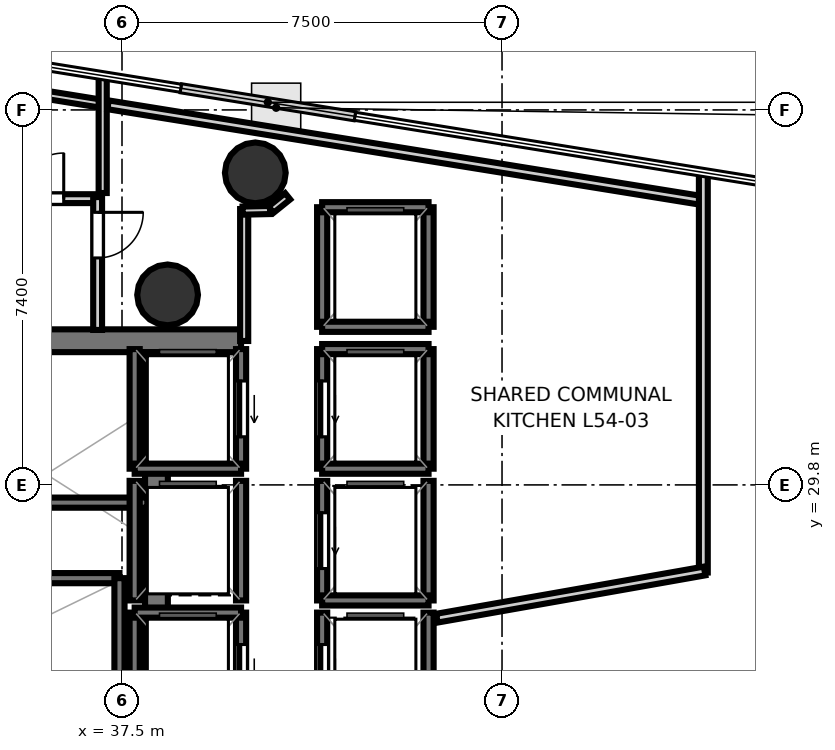
"""IFC4 building model, lengths in metres.
Left out: names, types, materials, properties, quantities, classifications, styles, units other than length and angle.
Written with IfcOpenShell. Run it as: python <this file> out.ifc"""

import sys

from ifc_helpers import new_model, si_unit, direction, frame, frame_2d, origin, origin_2d, place, context, subcontext, project, spatial, rectangle, hollow_circle, extrude, element, fill, save


model = new_model("IFC4")
c1 = context("Model", 3, precision=1e-05, world=origin(), true_north=direction((0.0, 1.0)))
c2 = subcontext(c1, "Body", "Model", "MODEL_VIEW")
j1 = project(units=[si_unit("LENGTHUNIT", "METRE"), si_unit("PLANEANGLEUNIT", "RADIAN")], contexts=[c1])
p1 = place(None, origin())
s1 = spatial("IfcSite", under=j1, at=p1, CompositionType="ELEMENT")
p2 = place(p1, origin())
s2 = spatial("IfcBuilding", under=s1, at=p2, CompositionType="ELEMENT")
p3 = place(p2, frame((0.0, 0.0, 211.4)))
s3 = spatial("IfcBuildingStorey", under=s2, at=p3, CompositionType="ELEMENT", Elevation=211.4)
p4 = place(p3, frame((29.33, 32.645, 0.0), z_axis=(0.0, 0.0, 1.0), x_axis=(1.0, 0.0, 0.0)))
e1 = element("IfcWall", 1, at=p4, inside=s3, PredefinedType="SHEAR", context=c2, shape_type="SweptSolid", body=[
    extrude(rectangle(XDim=10.52, YDim=0.45, at=frame_2d((5.26, 0.0))), origin(), (0.0, 0.0, 1.0), 3.52),
])
p5 = place(p4, frame((0.895, 0.0, 0.0)))
e2 = element("IfcOpeningElement", 2, at=p5, cuts=e1, PredefinedType="OPENING", context=c2, shape_type="SweptSolid", body=[
    extrude(rectangle(XDim=1.25, YDim=2.15, at=frame_2d((0.625, 1.075))), frame((0.0, 0.235, 0.0), z_axis=(0.0, -1.0, 0.0), x_axis=(1.0, 0.0, 0.0)), (0.0, 0.0, 1.0), 0.47),
])
p6 = place(p3, frame((38.18, 24.98, 0.0), z_axis=(0.0, 0.0, 1.0), x_axis=(0.0, 1.0, 0.0)))
e3 = element("IfcWall", 3, at=p6, inside=s3, PredefinedType="SHEAR", context=c2, shape_type="SweptSolid", body=[
    extrude(rectangle(XDim=7.44, YDim=0.45, at=frame_2d((3.72, 0.0))), origin(), (0.0, 0.0, 1.0), 3.52),
])
for number, where, z_axis, x_axis in (
    (4, (38.4, 33.55, 0.0), (0.0, 0.0, 1.0), (1.0, 0.0, 0.0)),
    (5, (40.131, 35.958, 0.0), (0.0, 0.0, 1.0), (1.0, 0.0, 0.0)),
):
    element("IfcColumn", number, at=place(p3, frame(where, z_axis=z_axis, x_axis=x_axis)), inside=s3, PredefinedType="COLUMN", context=c2, shape_type="SweptSolid", body=[
        extrude(hollow_circle(Radius=0.6, WallThickness=0.03, at=origin_2d()), origin(), (0.0, 0.0, 1.0), 3.7),
    ])
p7 = place(p3, frame((29.7, 29.45, 0.0), z_axis=(0.0, 0.0, 1.0), x_axis=(1.0, 0.0, 0.0)))
e6 = element("IfcWall", 6, at=p7, inside=s3, PredefinedType="SOLIDWALL", context=c2, shape_type="SweptSolid", body=[
    extrude(rectangle(XDim=8.3, YDim=0.2, at=frame_2d((4.15, 0.0))), origin(), (0.0, 0.0, 1.0), 3.52),
])
p8 = place(p3, frame((29.7, 27.96, 0.0), z_axis=(0.0, 0.0, 1.0), x_axis=(1.0, 0.0, 0.0)))
e7 = element("IfcWall", 7, at=p8, inside=s3, PredefinedType="SOLIDWALL", context=c2, shape_type="SweptSolid", body=[
    extrude(rectangle(XDim=7.75, YDim=0.2, at=frame_2d((3.875, 0.0))), origin(), (0.0, 0.0, 1.0), 3.52),
])
p9 = place(p3, frame((37.45, 24.9, 0.0), z_axis=(0.0, 0.0, 1.0), x_axis=(0.0, 1.0, 0.0)))
e8 = element("IfcWall", 8, at=p9, inside=s3, PredefinedType="SOLIDWALL", context=c2, shape_type="SweptSolid", body=[
    extrude(rectangle(XDim=3.06, YDim=0.2, at=frame_2d((1.53, 0.0))), origin(), (0.0, 0.0, 1.0), 3.52),
])
p10 = place(p3, frame((39.85, 30.12, 0.0), z_axis=(0.0, 0.0, 1.0), x_axis=(0.0, 1.0, 0.0)))
e9 = element("IfcWall", 9, at=p10, inside=s3, PredefinedType="SOLIDWALL", context=c2, shape_type="SweptSolid", body=[
    extrude(rectangle(XDim=2.36, YDim=0.2, at=frame_2d((1.18, 0.0))), origin(), (0.0, 0.0, 1.0), 3.52),
])
p11 = place(p10, frame((0.63, 0.0, 0.0)))
e10 = element("IfcOpeningElement", 10, at=p11, cuts=e9, PredefinedType="OPENING", context=c2, shape_type="SweptSolid", body=[
    extrude(rectangle(XDim=1.1, YDim=2.15, at=frame_2d((0.55, 1.075))), frame((0.0, 0.11, 0.0), z_axis=(0.0, -1.0, 0.0), x_axis=(1.0, 0.0, 0.0)), (0.0, 0.0, 1.0), 0.22),
])
p12 = place(p3, frame((37.75, 30.12, 0.0), z_axis=(0.0, 0.0, 1.0), x_axis=(0.0, 1.0, 0.0)))
e11 = element("IfcWall", 11, at=p12, inside=s3, PredefinedType="SOLIDWALL", context=c2, shape_type="SweptSolid", body=[
    extrude(rectangle(XDim=2.36, YDim=0.2, at=frame_2d((1.18, 0.0))), origin(), (0.0, 0.0, 1.0), 3.52),
])
p13 = place(p3, frame((37.75, 30.12, 0.0), z_axis=(0.0, 0.0, 1.0), x_axis=(1.0, 0.0, 0.0)))
e12 = element("IfcWall", 12, at=p13, inside=s3, PredefinedType="SOLIDWALL", context=c2, shape_type="SweptSolid", body=[
    extrude(rectangle(XDim=2.1, YDim=0.2, at=frame_2d((1.05, 0.0))), origin(), (0.0, 0.0, 1.0), 3.52),
])
p14 = place(p3, frame((39.85, 24.92, 0.0), z_axis=(0.0, 0.0, 1.0), x_axis=(0.0, 1.0, 0.0)))
e13 = element("IfcWall", 13, at=p14, inside=s3, PredefinedType="SOLIDWALL", context=c2, shape_type="SweptSolid", body=[
    extrude(rectangle(XDim=2.36, YDim=0.2, at=frame_2d((1.18, 0.0))), origin(), (0.0, 0.0, 1.0), 3.52),
])
p15 = place(p14, frame((0.63, 0.0, 0.0)))
e14 = element("IfcOpeningElement", 14, at=p15, cuts=e13, PredefinedType="OPENING", context=c2, shape_type="SweptSolid", body=[
    extrude(rectangle(XDim=1.1, YDim=2.15, at=frame_2d((0.55, 1.075))), frame((0.0, 0.11, 0.0), z_axis=(0.0, -1.0, 0.0), x_axis=(1.0, 0.0, 0.0)), (0.0, 0.0, 1.0), 0.22),
])
p16 = place(p3, frame((37.75, 24.92, 0.0), z_axis=(0.0, 0.0, 1.0), x_axis=(0.0, 1.0, 0.0)))
e15 = element("IfcWall", 15, at=p16, inside=s3, PredefinedType="SOLIDWALL", context=c2, shape_type="SweptSolid", body=[
    extrude(rectangle(XDim=2.36, YDim=0.2, at=frame_2d((1.18, 0.0))), origin(), (0.0, 0.0, 1.0), 3.52),
])
p17 = place(p3, frame((37.75, 27.28, 0.0), z_axis=(0.0, 0.0, 1.0), x_axis=(1.0, 0.0, 0.0)))
e16 = element("IfcWall", 16, at=p17, inside=s3, PredefinedType="SOLIDWALL", context=c2, shape_type="SweptSolid", body=[
    extrude(rectangle(XDim=2.1, YDim=0.2, at=frame_2d((1.05, 0.0))), origin(), (0.0, 0.0, 1.0), 3.52),
])
p18 = place(p3, frame((43.55, 30.12, 0.0), z_axis=(0.0, 0.0, 1.0), x_axis=(0.0, 1.0, 0.0)))
e17 = element("IfcWall", 17, at=p18, inside=s3, PredefinedType="SOLIDWALL", context=c2, shape_type="SweptSolid", body=[
    extrude(rectangle(XDim=2.36, YDim=0.2, at=frame_2d((1.18, 0.0))), origin(), (0.0, 0.0, 1.0), 3.52),
])
p19 = place(p3, frame((41.45, 30.12, 0.0), z_axis=(0.0, 0.0, 1.0), x_axis=(0.0, 1.0, 0.0)))
e18 = element("IfcWall", 18, at=p19, inside=s3, PredefinedType="SOLIDWALL", context=c2, shape_type="SweptSolid", body=[
    extrude(rectangle(XDim=2.36, YDim=0.2, at=frame_2d((1.18, 0.0))), origin(), (0.0, 0.0, 1.0), 3.52),
])
p20 = place(p19, frame((0.63, 0.0, 0.0)))
e19 = element("IfcOpeningElement", 19, at=p20, cuts=e18, PredefinedType="OPENING", context=c2, shape_type="SweptSolid", body=[
    extrude(rectangle(XDim=1.1, YDim=2.15, at=frame_2d((0.55, 1.075))), frame((0.0, 0.11, 0.0), z_axis=(0.0, -1.0, 0.0), x_axis=(1.0, 0.0, 0.0)), (0.0, 0.0, 1.0), 0.22),
])
for number, where, z_axis, x_axis in (
    (20, (41.45, 32.48, 0.0), (0.0, 0.0, 1.0), (1.0, 0.0, 0.0)),
    (21, (41.45, 30.12, 0.0), (0.0, 0.0, 1.0), (1.0, 0.0, 0.0)),
):
    element("IfcWall", number, at=place(p3, frame(where, z_axis=z_axis, x_axis=x_axis)), inside=s3, PredefinedType="SOLIDWALL", context=c2, shape_type="SweptSolid", body=[
        extrude(rectangle(XDim=2.1, YDim=0.2, at=frame_2d((1.05, 0.0))), origin(), (0.0, 0.0, 1.0), 3.52),
    ])
p21 = place(p3, frame((43.55, 27.52, 0.0), z_axis=(0.0, 0.0, 1.0), x_axis=(0.0, 1.0, 0.0)))
e22 = element("IfcWall", 22, at=p21, inside=s3, PredefinedType="SOLIDWALL", context=c2, shape_type="SweptSolid", body=[
    extrude(rectangle(XDim=2.36, YDim=0.2, at=frame_2d((1.18, 0.0))), origin(), (0.0, 0.0, 1.0), 3.52),
])
p22 = place(p3, frame((41.45, 27.52, 0.0), z_axis=(0.0, 0.0, 1.0), x_axis=(0.0, 1.0, 0.0)))
e23 = element("IfcWall", 23, at=p22, inside=s3, PredefinedType="SOLIDWALL", context=c2, shape_type="SweptSolid", body=[
    extrude(rectangle(XDim=2.36, YDim=0.2, at=frame_2d((1.18, 0.0))), origin(), (0.0, 0.0, 1.0), 3.52),
])
p23 = place(p22, frame((0.63, 0.0, 0.0)))
e24 = element("IfcOpeningElement", 24, at=p23, cuts=e23, PredefinedType="OPENING", context=c2, shape_type="SweptSolid", body=[
    extrude(rectangle(XDim=1.1, YDim=2.15, at=frame_2d((0.55, 1.075))), frame((0.0, 0.11, 0.0), z_axis=(0.0, -1.0, 0.0), x_axis=(1.0, 0.0, 0.0)), (0.0, 0.0, 1.0), 0.22),
])
p24 = place(p3, frame((41.45, 27.52, 0.0), z_axis=(0.0, 0.0, 1.0), x_axis=(1.0, 0.0, 0.0)))
e25 = element("IfcWall", 25, at=p24, inside=s3, PredefinedType="SOLIDWALL", context=c2, shape_type="SweptSolid", body=[
    extrude(rectangle(XDim=2.1, YDim=0.2, at=frame_2d((1.05, 0.0))), origin(), (0.0, 0.0, 1.0), 3.52),
])
p25 = place(p3, frame((43.55, 24.92, 0.0), z_axis=(0.0, 0.0, 1.0), x_axis=(0.0, 1.0, 0.0)))
e26 = element("IfcWall", 26, at=p25, inside=s3, PredefinedType="SOLIDWALL", context=c2, shape_type="SweptSolid", body=[
    extrude(rectangle(XDim=2.36, YDim=0.2, at=frame_2d((1.18, 0.0))), origin(), (0.0, 0.0, 1.0), 3.52),
])
p26 = place(p3, frame((41.45, 24.92, 0.0), z_axis=(0.0, 0.0, 1.0), x_axis=(0.0, 1.0, 0.0)))
e27 = element("IfcWall", 27, at=p26, inside=s3, PredefinedType="SOLIDWALL", context=c2, shape_type="SweptSolid", body=[
    extrude(rectangle(XDim=2.36, YDim=0.2, at=frame_2d((1.18, 0.0))), origin(), (0.0, 0.0, 1.0), 3.52),
])
p27 = place(p26, frame((0.63, 0.0, 0.0)))
e28 = element("IfcOpeningElement", 28, at=p27, cuts=e27, PredefinedType="OPENING", context=c2, shape_type="SweptSolid", body=[
    extrude(rectangle(XDim=1.1, YDim=2.15, at=frame_2d((0.55, 1.075))), frame((0.0, 0.11, 0.0), z_axis=(0.0, -1.0, 0.0), x_axis=(1.0, 0.0, 0.0)), (0.0, 0.0, 1.0), 0.22),
])
for number, where, z_axis, x_axis in (
    (29, (39.85, 27.52, 0.0), (0.0, 0.0, 1.0), (0.0, 1.0, 0.0)),
    (30, (37.75, 27.52, 0.0), (0.0, 0.0, 1.0), (0.0, 1.0, 0.0)),
):
    element("IfcWall", number, at=place(p3, frame(where, z_axis=z_axis, x_axis=x_axis)), inside=s3, PredefinedType="SOLIDWALL", context=c2, shape_type="SweptSolid", body=[
        extrude(rectangle(XDim=2.36, YDim=0.2, at=frame_2d((1.18, 0.0))), origin(), (0.0, 0.0, 1.0), 3.52),
    ])
for number, where, z_axis, x_axis in (
    (31, (43.55, 32.92, 0.0), (0.0, 0.0, 1.0), (0.0, 1.0, 0.0)),
    (32, (41.45, 32.92, 0.0), (0.0, 0.0, 1.0), (0.0, 1.0, 0.0)),
):
    element("IfcWall", number, at=place(p3, frame(where, z_axis=z_axis, x_axis=x_axis)), inside=s3, PredefinedType="SOLIDWALL", context=c2, shape_type="SweptSolid", body=[
        extrude(rectangle(XDim=2.36, YDim=0.2, at=frame_2d((1.18, 0.0))), origin(), (0.0, 0.0, 1.0), 3.52),
    ])
for number, where, z_axis, x_axis in (
    (33, (41.45, 35.28, 0.0), (0.0, 0.0, 1.0), (1.0, 0.0, 0.0)),
    (34, (41.45, 32.92, 0.0), (0.0, 0.0, 1.0), (1.0, 0.0, 0.0)),
):
    element("IfcWall", number, at=place(p3, frame(where, z_axis=z_axis, x_axis=x_axis)), inside=s3, PredefinedType="SOLIDWALL", context=c2, shape_type="SweptSolid", body=[
        extrude(rectangle(XDim=2.1, YDim=0.2, at=frame_2d((1.05, 0.0))), origin(), (0.0, 0.0, 1.0), 3.52),
    ])
p28 = place(p3, frame((39.911, 32.64, 0.0), z_axis=(0.0, 0.0, 1.0), x_axis=(0.0, 1.0, 0.0)))
e35 = element("IfcWall", 35, at=p28, inside=s3, PredefinedType="PARTITIONING", context=c2, shape_type="SweptSolid", body=[
    extrude(rectangle(XDim=2.604, YDim=0.16, at=frame_2d((1.302, 0.0))), origin(), (0.0, 0.0, 1.0), 2.84),
])
p29 = place(p3, frame((39.881, 35.213, 0.0), z_axis=(0.0, 0.0, 1.0), x_axis=(0.999756500784, 0.02206669754, 0.0)))
e36 = element("IfcWall", 36, at=p29, inside=s3, PredefinedType="PARTITIONING", context=c2, shape_type="SweptSolid", body=[
    extrude(rectangle(XDim=0.542, YDim=0.16, at=frame_2d((0.271, 0.0))), origin(), (0.0, 0.0, 1.0), 2.84),
])
p30 = place(p3, frame((40.441, 35.232, 0.0), z_axis=(0.0, 0.0, 1.0), x_axis=(0.778714564707, 0.627378376033, 0.0)))
e37 = element("IfcWall", 37, at=p30, inside=s3, PredefinedType="PARTITIONING", context=c2, shape_type="SweptSolid", body=[
    extrude(rectangle(XDim=0.421, YDim=0.16, at=frame_2d((0.21, 0.0))), origin(), (0.0, 0.0, 1.0), 2.84),
])
p31 = place(p3, frame((34.75, 35.449, 0.0), z_axis=(0.0, 0.0, 1.0), x_axis=(1.0, 0.0, 0.0)))
e38 = element("IfcWall", 38, at=p31, inside=s3, PredefinedType="PLUMBINGWALL", context=c2, shape_type="SweptSolid", body=[
    extrude(rectangle(XDim=2.3, YDim=0.175, at=frame_2d((1.15, 0.0))), origin(), (0.0, 0.0, 1.0), 2.84),
])
p32 = place(p31, frame((0.7, 0.0, 0.0)))
e39 = element("IfcOpeningElement", 39, at=p32, cuts=e38, PredefinedType="OPENING", context=c2, shape_type="SweptSolid", body=[
    extrude(rectangle(XDim=0.9, YDim=2.1, at=frame_2d((0.45, 1.05))), frame((0.0, 0.097, 0.0), z_axis=(0.0, -1.0, 0.0), x_axis=(1.0, 0.0, 0.0)), (0.0, 0.0, 1.0), 0.195),
])
p33 = place(p3, frame((37.019, 35.48, 0.0), z_axis=(0.0, 0.0, 1.0), x_axis=(0.0, -1.0, 0.0)))
e40 = element("IfcWall", 40, at=p33, inside=s3, PredefinedType="PLUMBINGWALL", context=c2, shape_type="SweptSolid", body=[
    extrude(rectangle(XDim=2.622, YDim=0.175, at=frame_2d((1.311, 0.0))), origin(), (0.0, 0.0, 1.0), 2.84),
])
p34 = place(p33, frame((0.301, 0.0, 0.0)))
e41 = element("IfcOpeningElement", 41, at=p34, cuts=e40, PredefinedType="OPENING", context=c2, shape_type="SweptSolid", body=[
    extrude(rectangle(XDim=0.9, YDim=2.1, at=frame_2d((0.45, 1.05))), frame((0.0, 0.097, 0.0), z_axis=(0.0, -1.0, 0.0), x_axis=(1.0, 0.0, 0.0)), (0.0, 0.0, 1.0), 0.195),
])
p35 = place(p3, frame((30.904, 38.319, 0.0), z_axis=(0.0, 0.0, 1.0), x_axis=(0.987265785491, -0.159079441788, 0.0)))
e42 = element("IfcWall", 42, at=p35, inside=s3, PredefinedType="PARTITIONING", context=c2, shape_type="SweptSolid", body=[
    extrude(rectangle(XDim=6.322, YDim=0.16, at=frame_2d((3.161, 0.0))), origin(), (0.0, 0.0, 1.0), 2.84),
])
p36 = place(p3, frame((37.119, 37.896, 0.0), z_axis=(0.0, 0.0, 1.0), x_axis=(0.0, -1.0, 0.0)))
e43 = element("IfcWall", 43, at=p36, inside=s3, PredefinedType="PARTITIONING", context=c2, shape_type="SweptSolid", body=[
    extrude(rectangle(XDim=2.336, YDim=0.16, at=frame_2d((1.168, 0.0))), origin(), (0.0, 0.0, 1.0), 2.84),
])
p37 = place(p3, frame((37.225, 37.301, 0.0), z_axis=(0.0, 0.0, 1.0), x_axis=(0.987268097612, -0.159065091827, 0.0)))
e44 = element("IfcWall", 44, at=p37, inside=s3, PredefinedType="PLUMBINGWALL", context=c2, shape_type="SweptSolid", body=[
    extrude(rectangle(XDim=11.926, YDim=0.175, at=frame_2d((5.963, 0.0))), origin(), (0.0, 0.0, 1.0), 2.84),
])
p38 = place(p3, frame((48.973, 35.986, 0.0), z_axis=(0.0, 0.0, 1.0), x_axis=(0.0, -1.0, 0.0)))
e45 = element("IfcWall", 45, at=p38, inside=s3, PredefinedType="PLUMBINGWALL", context=c2, shape_type="SweptSolid", body=[
    extrude(rectangle(XDim=7.915, YDim=0.175, at=frame_2d((3.958, 0.0))), origin(), (0.0, 0.0, 1.0), 2.84),
])
p39 = place(p3, frame((48.999, 28.102, 0.0), z_axis=(0.0, 0.0, 1.0), x_axis=(-0.984809658173, -0.173637372619, 0.0)))
e46 = element("IfcWall", 46, at=p39, inside=s3, PredefinedType="PLUMBINGWALL", context=c2, shape_type="SweptSolid", body=[
    extrude(rectangle(XDim=5.365, YDim=0.175, at=frame_2d((2.683, 0.0))), origin(), (0.0, 0.0, 1.0), 2.84),
])
p40 = place(p3, frame((58.685, 29.083, 0.0), z_axis=(0.0, 0.0, 1.0), x_axis=(-0.753948689731, -0.656933309593, 0.0)))
e47 = element("IfcWall", 47, at=p40, inside=s3, PredefinedType="PLUMBINGWALL", context=c2, shape_type="SweptSolid", body=[
    extrude(rectangle(XDim=11.77, YDim=0.175, at=frame_2d((5.885, 0.0))), origin(), (0.0, 0.0, 1.0), 2.84),
])
p41 = place(p11, origin())
e48 = element("IfcDoor", 48, at=p41, inside=s3, OperationType="SLIDING_TO_LEFT", PredefinedType="DOOR", context=c2, shape_type="SweptSolid", body=[
    extrude(rectangle(XDim=1.1, YDim=2.15, at=frame_2d((0.55, 1.075))), frame((0.0, 0.025, 0.0), z_axis=(0.0, -1.0, 0.0), x_axis=(1.0, 0.0, 0.0)), (0.0, 0.0, 1.0), 0.05),
])
fill(e10, e48)
p42 = place(p15, origin())
e49 = element("IfcDoor", 49, at=p42, inside=s3, OperationType="SLIDING_TO_LEFT", PredefinedType="DOOR", context=c2, shape_type="SweptSolid", body=[
    extrude(rectangle(XDim=1.1, YDim=2.15, at=frame_2d((0.55, 1.075))), frame((0.0, 0.025, 0.0), z_axis=(0.0, -1.0, 0.0), x_axis=(1.0, 0.0, 0.0)), (0.0, 0.0, 1.0), 0.05),
])
fill(e14, e49)
p43 = place(p20, origin())
e50 = element("IfcDoor", 50, at=p43, inside=s3, OperationType="SLIDING_TO_LEFT", PredefinedType="DOOR", context=c2, shape_type="SweptSolid", body=[
    extrude(rectangle(XDim=1.1, YDim=2.15, at=frame_2d((0.55, 1.075))), frame((0.0, 0.025, 0.0), z_axis=(0.0, -1.0, 0.0), x_axis=(1.0, 0.0, 0.0)), (0.0, 0.0, 1.0), 0.05),
])
fill(e19, e50)
p44 = place(p23, origin())
e51 = element("IfcDoor", 51, at=p44, inside=s3, OperationType="SLIDING_TO_LEFT", PredefinedType="DOOR", context=c2, shape_type="SweptSolid", body=[
    extrude(rectangle(XDim=1.1, YDim=2.15, at=frame_2d((0.55, 1.075))), frame((0.0, 0.025, 0.0), z_axis=(0.0, -1.0, 0.0), x_axis=(1.0, 0.0, 0.0)), (0.0, 0.0, 1.0), 0.05),
])
fill(e24, e51)
p45 = place(p27, origin())
e52 = element("IfcDoor", 52, at=p45, inside=s3, OperationType="SLIDING_TO_LEFT", PredefinedType="DOOR", context=c2, shape_type="SweptSolid", body=[
    extrude(rectangle(XDim=1.1, YDim=2.15, at=frame_2d((0.55, 1.075))), frame((0.0, 0.025, 0.0), z_axis=(0.0, -1.0, 0.0), x_axis=(1.0, 0.0, 0.0)), (0.0, 0.0, 1.0), 0.05),
])
fill(e28, e52)
p46 = place(p32, origin())
e53 = element("IfcDoor", 53, at=p46, inside=s3, OperationType="SINGLE_SWING_RIGHT", PredefinedType="DOOR", context=c2, shape_type="SweptSolid", body=[
    extrude(rectangle(XDim=0.9, YDim=2.1, at=frame_2d((0.45, 1.05))), frame((0.0, 0.025, 0.0), z_axis=(0.0, -1.0, 0.0), x_axis=(1.0, 0.0, 0.0)), (0.0, 0.0, 1.0), 0.05),
])
fill(e39, e53)
p47 = place(p34, origin())
e54 = element("IfcDoor", 54, at=p47, inside=s3, OperationType="SINGLE_SWING_LEFT", PredefinedType="DOOR", context=c2, shape_type="SweptSolid", body=[
    extrude(rectangle(XDim=0.9, YDim=2.1, at=frame_2d((0.45, 1.05))), frame((0.0, 0.025, 0.0), z_axis=(0.0, -1.0, 0.0), x_axis=(1.0, 0.0, 0.0)), (0.0, 0.0, 1.0), 0.05),
])
fill(e41, e54)
save(model, sys.argv[1])
